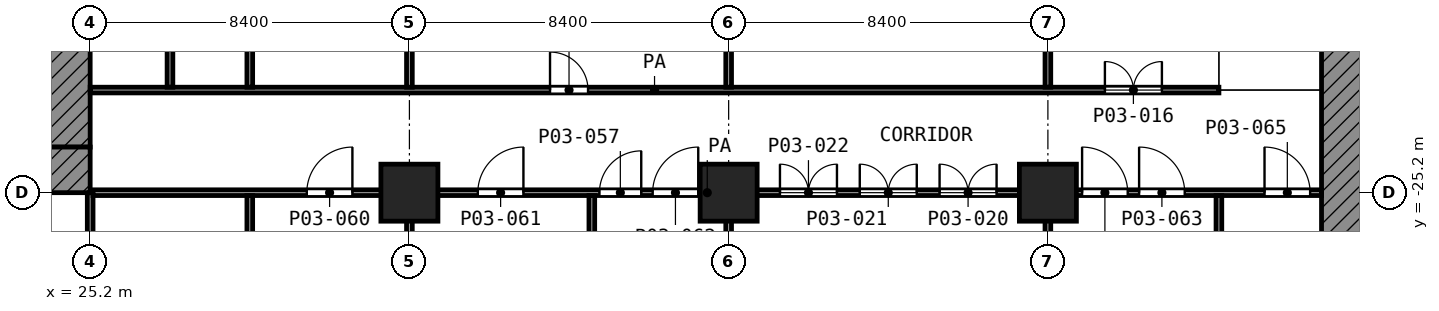
"""IFC4 building model, lengths in metres.
Left out: names, types, materials, properties, quantities, classifications, styles, units other than length and angle.
Written with IfcOpenShell. Run it as: python <this file> out.ifc"""

import sys

from ifc_helpers import new_model, si_unit, direction, frame, frame_2d, origin, origin_2d, place, context, subcontext, project, spatial, polyline, rectangle, outline, extrude, element, fill, save


model = new_model("IFC4")
c1 = context("Model", 3, precision=1e-05, world=origin(), true_north=direction((0.0, 1.0)))
c2 = subcontext(c1, "Body", "Model", "MODEL_VIEW")
j1 = project(units=[si_unit("LENGTHUNIT", "METRE"), si_unit("PLANEANGLEUNIT", "RADIAN")], contexts=[c1])
p1 = place(None, origin())
s1 = spatial("IfcSite", under=j1, at=p1, CompositionType="ELEMENT")
p2 = place(p1, origin())
s2 = spatial("IfcBuilding", under=s1, at=p2, CompositionType="ELEMENT")
p3 = place(p2, frame((0.0, 0.0, 12.6)))
s3 = spatial("IfcBuildingStorey", under=s2, at=p3, CompositionType="ELEMENT", Elevation=12.6)
for number, where, z_axis, x_axis in (
    (1, (33.6, -25.2, 0.0), (0.0, 0.0, 1.0), (1.0, 0.0, 0.0)),
    (2, (42.0, -25.2, 0.0), (0.0, 0.0, 1.0), (1.0, 0.0, 0.0)),
    (3, (50.4, -25.2, 0.0), (0.0, 0.0, 1.0), (1.0, 0.0, 0.0)),
):
    element("IfcColumn", number, at=place(p3, frame(where, z_axis=z_axis, x_axis=x_axis)), inside=s3, PredefinedType="COLUMN", context=c2, shape_type="SweptSolid", body=[
        extrude(rectangle(XDim=1.5, YDim=1.5, at=origin_2d()), origin(), (0.0, 0.0, 1.0), 5.6),
    ])
p4 = place(p3, frame((0.0, 0.0, -12.6), z_axis=(0.0, -1.0, 0.0), x_axis=(1.0, 0.0, 0.0)))
e4 = element("IfcWall", 4, at=p4, inside=s3, PredefinedType="SHEAR", context=c2, shape_type="SweptSolid", body=[
    extrude(outline(polyline([(62.938, 18.2), (62.484, 17.583), (61.414, 15.591), (60.634, 13.468), (60.448, 12.6), (57.6, 12.6), (57.6, 18.2), (62.938, 18.2)])), origin(), (0.0, 0.0, 1.0), 33.6),
])
p5 = place(p3, frame((24.6, -24.0, 0.0), z_axis=(0.0, 0.0, 1.0), x_axis=(0.0, 1.0, 0.0)))
e5 = element("IfcWall", 5, at=p5, inside=s3, PredefinedType="SHEAR", context=c2, shape_type="SweptSolid", body=[
    extrude(rectangle(XDim=18.6, YDim=1.2, at=frame_2d((9.3, 0.0))), origin(), (0.0, 0.0, 1.0), 5.25),
])
p6 = place(p5, frame((10.5, 0.0, 0.0)))
e6 = element("IfcOpeningElement", 6, at=p6, cuts=e5, PredefinedType="OPENING", context=c2, shape_type="SweptSolid", body=[
    extrude(rectangle(XDim=1.8, YDim=2.1, at=frame_2d((0.9, 1.05))), frame((0.0, 0.61, 0.0), z_axis=(0.0, -1.0, 0.0), x_axis=(1.0, 0.0, 0.0)), (0.0, 0.0, 1.0), 1.22),
])
p7 = place(p3, frame((24.6, -25.2, 0.0), z_axis=(0.0, 0.0, 1.0), x_axis=(0.0, 1.0, 0.0)))
e7 = element("IfcWall", 7, at=p7, inside=s3, PredefinedType="SHEAR", context=c2, shape_type="SweptSolid", body=[
    extrude(rectangle(XDim=1.2, YDim=1.2, at=frame_2d((0.6, 0.0))), origin(), (0.0, 0.0, 1.0), 5.25),
])
p8 = place(p3, frame((25.275, -25.2, 0.0), z_axis=(0.0, 0.0, 1.0), x_axis=(1.0, 0.0, 0.0)))
e8 = element("IfcWall", 8, at=p8, inside=s3, PredefinedType="PARTITIONING", context=c2, shape_type="SweptSolid", body=[
    extrude(rectangle(XDim=32.325, YDim=0.15, at=frame_2d((16.163, 0.0))), origin(), (0.0, 0.0, 1.0), 5.25),
])
p9 = place(p8, frame((5.625, 0.0, 0.0)))
e9 = element("IfcOpeningElement", 9, at=p9, cuts=e8, PredefinedType="OPENING", context=c2, shape_type="SweptSolid", body=[
    extrude(rectangle(XDim=1.2, YDim=2.1, at=frame_2d((0.6, 1.05))), frame((0.0, 0.085, 0.0), z_axis=(0.0, -1.0, 0.0), x_axis=(1.0, 0.0, 0.0)), (0.0, 0.0, 1.0), 0.17),
])
p10 = place(p8, frame((10.125, 0.0, 0.0)))
e10 = element("IfcOpeningElement", 10, at=p10, cuts=e8, PredefinedType="OPENING", context=c2, shape_type="SweptSolid", body=[
    extrude(rectangle(XDim=1.2, YDim=2.1, at=frame_2d((0.6, 1.05))), frame((0.0, 0.085, 0.0), z_axis=(0.0, -1.0, 0.0), x_axis=(1.0, 0.0, 0.0)), (0.0, 0.0, 1.0), 0.17),
])
p11 = place(p8, frame((14.725, 0.0, 0.0)))
e11 = element("IfcOpeningElement", 11, at=p11, cuts=e8, PredefinedType="OPENING", context=c2, shape_type="SweptSolid", body=[
    extrude(rectangle(XDim=1.2, YDim=2.1, at=frame_2d((0.6, 1.05))), frame((0.0, 0.085, 0.0), z_axis=(0.0, -1.0, 0.0), x_axis=(1.0, 0.0, 0.0)), (0.0, 0.0, 1.0), 0.17),
])
p12 = place(p8, frame((13.325, 0.0, 0.0)))
e12 = element("IfcOpeningElement", 12, at=p12, cuts=e8, PredefinedType="OPENING", context=c2, shape_type="SweptSolid", body=[
    extrude(rectangle(XDim=1.1, YDim=2.1, at=frame_2d((0.55, 1.05))), frame((0.0, 0.085, 0.0), z_axis=(0.0, -1.0, 0.0), x_axis=(1.0, 0.0, 0.0)), (0.0, 0.0, 1.0), 0.17),
])
p13 = place(p8, frame((22.275, 0.0, 0.0)))
e13 = element("IfcOpeningElement", 13, at=p13, cuts=e8, PredefinedType="OPENING", context=c2, shape_type="SweptSolid", body=[
    extrude(rectangle(XDim=1.5, YDim=2.1, at=frame_2d((0.75, 1.05))), frame((0.0, 0.085, 0.0), z_axis=(0.0, -1.0, 0.0), x_axis=(1.0, 0.0, 0.0)), (0.0, 0.0, 1.0), 0.17),
])
p14 = place(p8, frame((20.175, 0.0, 0.0)))
e14 = element("IfcOpeningElement", 14, at=p14, cuts=e8, PredefinedType="OPENING", context=c2, shape_type="SweptSolid", body=[
    extrude(rectangle(XDim=1.5, YDim=2.1, at=frame_2d((0.75, 1.05))), frame((0.0, 0.085, 0.0), z_axis=(0.0, -1.0, 0.0), x_axis=(1.0, 0.0, 0.0)), (0.0, 0.0, 1.0), 0.17),
])
p15 = place(p8, frame((18.075, 0.0, 0.0)))
e15 = element("IfcOpeningElement", 15, at=p15, cuts=e8, PredefinedType="OPENING", context=c2, shape_type="SweptSolid", body=[
    extrude(rectangle(XDim=1.5, YDim=2.1, at=frame_2d((0.75, 1.05))), frame((0.0, 0.085, 0.0), z_axis=(0.0, -1.0, 0.0), x_axis=(1.0, 0.0, 0.0)), (0.0, 0.0, 1.0), 0.17),
])
p16 = place(p8, frame((27.525, 0.0, 0.0)))
e16 = element("IfcOpeningElement", 16, at=p16, cuts=e8, PredefinedType="OPENING", context=c2, shape_type="SweptSolid", body=[
    extrude(rectangle(XDim=1.2, YDim=2.1, at=frame_2d((0.6, 1.05))), frame((0.0, 0.085, 0.0), z_axis=(0.0, -1.0, 0.0), x_axis=(1.0, 0.0, 0.0)), (0.0, 0.0, 1.0), 0.17),
])
p17 = place(p8, frame((26.025, 0.0, 0.0)))
e17 = element("IfcOpeningElement", 17, at=p17, cuts=e8, PredefinedType="OPENING", context=c2, shape_type="SweptSolid", body=[
    extrude(rectangle(XDim=1.2, YDim=2.1, at=frame_2d((0.6, 1.05))), frame((0.0, 0.085, 0.0), z_axis=(0.0, -1.0, 0.0), x_axis=(1.0, 0.0, 0.0)), (0.0, 0.0, 1.0), 0.17),
])
p18 = place(p8, frame((30.825, 0.0, 0.0)))
e18 = element("IfcOpeningElement", 18, at=p18, cuts=e8, PredefinedType="OPENING", context=c2, shape_type="SweptSolid", body=[
    extrude(rectangle(XDim=1.2, YDim=2.1, at=frame_2d((0.6, 1.05))), frame((0.0, 0.085, 0.0), z_axis=(0.0, -1.0, 0.0), x_axis=(1.0, 0.0, 0.0)), (0.0, 0.0, 1.0), 0.17),
])
p19 = place(p3, frame((25.2, -22.5, 0.0), z_axis=(0.0, 0.0, 1.0), x_axis=(1.0, 0.0, 0.0)))
e19 = element("IfcWall", 19, at=p19, inside=s3, PredefinedType="PARTITIONING", context=c2, shape_type="SweptSolid", body=[
    extrude(rectangle(XDim=29.7, YDim=0.15, at=frame_2d((14.85, 0.0))), origin(), (0.0, 0.0, 1.0), 5.25),
])
p20 = place(p19, frame((12.1, 0.0, 0.0)))
e20 = element("IfcOpeningElement", 20, at=p20, cuts=e19, PredefinedType="OPENING", context=c2, shape_type="SweptSolid", body=[
    extrude(rectangle(XDim=1.0, YDim=2.1, at=frame_2d((0.5, 1.05))), frame((0.0, 0.085, 0.0), z_axis=(0.0, -1.0, 0.0), x_axis=(1.0, 0.0, 0.0)), (0.0, 0.0, 1.0), 0.17),
])
p21 = place(p19, frame((26.7, 0.0, 0.0)))
e21 = element("IfcOpeningElement", 21, at=p21, cuts=e19, PredefinedType="OPENING", context=c2, shape_type="SweptSolid", body=[
    extrude(rectangle(XDim=1.5, YDim=2.1, at=frame_2d((0.75, 1.05))), frame((0.0, 0.085, 0.0), z_axis=(0.0, -1.0, 0.0), x_axis=(1.0, 0.0, 0.0)), (0.0, 0.0, 1.0), 0.17),
])
p22 = place(p3, frame((25.2, -81.3, 0.0), z_axis=(0.0, 0.0, 1.0), x_axis=(0.0, 1.0, 0.0)))
e22 = element("IfcWall", 22, at=p22, inside=s3, PredefinedType="PARTITIONING", context=c2, shape_type="SweptSolid", body=[
    extrude(rectangle(XDim=56.1, YDim=0.15, at=frame_2d((28.05, 0.0))), origin(), (0.0, 0.0, 1.0), 5.25),
])
p23 = place(p22, frame((48.5, 0.0, 0.0)))
e23 = element("IfcOpeningElement", 23, at=p23, cuts=e22, PredefinedType="OPENING", context=c2, shape_type="SweptSolid", body=[
    extrude(rectangle(XDim=1.2, YDim=2.1, at=frame_2d((0.6, 1.05))), frame((0.0, 0.085, 0.0), z_axis=(0.0, -1.0, 0.0), x_axis=(1.0, 0.0, 0.0)), (0.0, 0.0, 1.0), 0.17),
])
p24 = place(p22, frame((40.1, 0.0, 0.0)))
e24 = element("IfcOpeningElement", 24, at=p24, cuts=e22, PredefinedType="OPENING", context=c2, shape_type="SweptSolid", body=[
    extrude(rectangle(XDim=1.2, YDim=2.1, at=frame_2d((0.6, 1.05))), frame((0.0, 0.085, 0.0), z_axis=(0.0, -1.0, 0.0), x_axis=(1.0, 0.0, 0.0)), (0.0, 0.0, 1.0), 0.17),
])
p25 = place(p22, frame((36.75, 0.0, 0.0)))
e25 = element("IfcOpeningElement", 25, at=p25, cuts=e22, PredefinedType="OPENING", context=c2, shape_type="SweptSolid", body=[
    extrude(rectangle(XDim=1.2, YDim=2.1, at=frame_2d((0.6, 1.05))), frame((0.0, 0.085, 0.0), z_axis=(0.0, -1.0, 0.0), x_axis=(1.0, 0.0, 0.0)), (0.0, 0.0, 1.0), 0.17),
])
p26 = place(p22, frame((32.55, 0.0, 0.0)))
e26 = element("IfcOpeningElement", 26, at=p26, cuts=e22, PredefinedType="OPENING", context=c2, shape_type="SweptSolid", body=[
    extrude(rectangle(XDim=1.2, YDim=2.1, at=frame_2d((0.6, 1.05))), frame((0.0, 0.085, 0.0), z_axis=(0.0, -1.0, 0.0), x_axis=(1.0, 0.0, 0.0)), (0.0, 0.0, 1.0), 0.17),
])
p27 = place(p22, frame((28.05, 0.0, 0.0)))
e27 = element("IfcOpeningElement", 27, at=p27, cuts=e22, PredefinedType="OPENING", context=c2, shape_type="SweptSolid", body=[
    extrude(rectangle(XDim=1.2, YDim=2.1, at=frame_2d((0.6, 1.05))), frame((0.0, 0.085, 0.0), z_axis=(0.0, -1.0, 0.0), x_axis=(1.0, 0.0, 0.0)), (0.0, 0.0, 1.0), 0.17),
])
p28 = place(p22, frame((23.85, 0.0, 0.0)))
e28 = element("IfcOpeningElement", 28, at=p28, cuts=e22, PredefinedType="OPENING", context=c2, shape_type="SweptSolid", body=[
    extrude(rectangle(XDim=1.2, YDim=2.1, at=frame_2d((0.6, 1.05))), frame((0.0, 0.085, 0.0), z_axis=(0.0, -1.0, 0.0), x_axis=(1.0, 0.0, 0.0)), (0.0, 0.0, 1.0), 0.17),
])
p29 = place(p22, frame((20.1, 0.0, 0.0)))
e29 = element("IfcOpeningElement", 29, at=p29, cuts=e22, PredefinedType="OPENING", context=c2, shape_type="SweptSolid", body=[
    extrude(rectangle(XDim=1.2, YDim=2.1, at=frame_2d((0.6, 1.05))), frame((0.0, 0.085, 0.0), z_axis=(0.0, -1.0, 0.0), x_axis=(1.0, 0.0, 0.0)), (0.0, 0.0, 1.0), 0.17),
])
p30 = place(p22, frame((15.9, 0.0, 0.0)))
e30 = element("IfcOpeningElement", 30, at=p30, cuts=e22, PredefinedType="OPENING", context=c2, shape_type="SweptSolid", body=[
    extrude(rectangle(XDim=1.2, YDim=2.1, at=frame_2d((0.6, 1.05))), frame((0.0, 0.085, 0.0), z_axis=(0.0, -1.0, 0.0), x_axis=(1.0, 0.0, 0.0)), (0.0, 0.0, 1.0), 0.17),
])
p31 = place(p22, frame((11.4, 0.0, 0.0)))
e31 = element("IfcOpeningElement", 31, at=p31, cuts=e22, PredefinedType="OPENING", context=c2, shape_type="SweptSolid", body=[
    extrude(rectangle(XDim=1.2, YDim=2.1, at=frame_2d((0.6, 1.05))), frame((0.0, 0.085, 0.0), z_axis=(0.0, -1.0, 0.0), x_axis=(1.0, 0.0, 0.0)), (0.0, 0.0, 1.0), 0.17),
])
p32 = place(p22, frame((7.2, 0.0, 0.0)))
e32 = element("IfcOpeningElement", 32, at=p32, cuts=e22, PredefinedType="OPENING", context=c2, shape_type="SweptSolid", body=[
    extrude(rectangle(XDim=1.2, YDim=2.1, at=frame_2d((0.6, 1.05))), frame((0.0, 0.085, 0.0), z_axis=(0.0, -1.0, 0.0), x_axis=(1.0, 0.0, 0.0)), (0.0, 0.0, 1.0), 0.17),
])
p33 = place(p22, frame((2.7, 0.0, 0.0)))
e33 = element("IfcOpeningElement", 33, at=p33, cuts=e22, PredefinedType="OPENING", context=c2, shape_type="SweptSolid", body=[
    extrude(rectangle(XDim=1.2, YDim=2.1, at=frame_2d((0.6, 1.05))), frame((0.0, 0.085, 0.0), z_axis=(0.0, -1.0, 0.0), x_axis=(1.0, 0.0, 0.0)), (0.0, 0.0, 1.0), 0.17),
])
p34 = place(p3, frame((27.3, -22.425, 0.0), z_axis=(0.0, 0.0, 1.0), x_axis=(0.0, 1.0, 0.0)))
e34 = element("IfcWall", 34, at=p34, inside=s3, PredefinedType="PARTITIONING", context=c2, shape_type="SweptSolid", body=[
    extrude(rectangle(XDim=8.25, YDim=0.15, at=frame_2d((4.125, 0.0))), origin(), (0.0, 0.0, 1.0), 5.25),
])
p35 = place(p3, frame((29.4, -39.525, 0.0), z_axis=(0.0, 0.0, 1.0), x_axis=(0.0, 1.0, 0.0)))
e35 = element("IfcWall", 35, at=p35, inside=s3, PredefinedType="PARTITIONING", context=c2, shape_type="SweptSolid", body=[
    extrude(rectangle(XDim=14.25, YDim=0.15, at=frame_2d((7.125, 0.0))), origin(), (0.0, 0.0, 1.0), 5.25),
])
p36 = place(p3, frame((29.4, -22.425, 0.0), z_axis=(0.0, 0.0, 1.0), x_axis=(0.0, 1.0, 0.0)))
e36 = element("IfcWall", 36, at=p36, inside=s3, PredefinedType="PARTITIONING", context=c2, shape_type="SweptSolid", body=[
    extrude(rectangle(XDim=11.325, YDim=0.15, at=frame_2d((5.663, 0.0))), origin(), (0.0, 0.0, 1.0), 5.25),
])
p37 = place(p3, frame((33.6, -39.525, 0.0), z_axis=(0.0, 0.0, 1.0), x_axis=(0.0, 1.0, 0.0)))
e37 = element("IfcWall", 37, at=p37, inside=s3, PredefinedType="PARTITIONING", context=c2, shape_type="SweptSolid", body=[
    extrude(rectangle(XDim=14.25, YDim=0.15, at=frame_2d((7.125, 0.0))), origin(), (0.0, 0.0, 1.0), 5.25),
])
p38 = place(p3, frame((33.6, -22.425, 0.0), z_axis=(0.0, 0.0, 1.0), x_axis=(0.0, 1.0, 0.0)))
e38 = element("IfcWall", 38, at=p38, inside=s3, PredefinedType="PARTITIONING", context=c2, shape_type="SweptSolid", body=[
    extrude(rectangle(XDim=11.25, YDim=0.15, at=frame_2d((5.625, 0.0))), origin(), (0.0, 0.0, 1.0), 5.25),
])
p39 = place(p3, frame((38.4, -37.487, 0.0), z_axis=(0.0, 0.0, 1.0), x_axis=(0.0, 1.0, 0.0)))
e39 = element("IfcWall", 39, at=p39, inside=s3, PredefinedType="PARTITIONING", context=c2, shape_type="SweptSolid", body=[
    extrude(rectangle(XDim=12.212, YDim=0.15, at=frame_2d((6.106, 0.0))), origin(), (0.0, 0.0, 1.0), 3.85),
])
p40 = place(p3, frame((42.0, -34.88, 0.0), z_axis=(0.0, 0.0, 1.0), x_axis=(0.0, 1.0, 0.0)))
e40 = element("IfcWall", 40, at=p40, inside=s3, PredefinedType="PARTITIONING", context=c2, shape_type="SweptSolid", body=[
    extrude(rectangle(XDim=9.605, YDim=0.15, at=frame_2d((4.802, 0.0))), origin(), (0.0, 0.0, 1.0), 3.85),
])
p41 = place(p3, frame((42.0, -22.425, 0.0), z_axis=(0.0, 0.0, 1.0), x_axis=(0.0, 1.0, 0.0)))
e41 = element("IfcWall", 41, at=p41, inside=s3, PredefinedType="PARTITIONING", context=c2, shape_type="SweptSolid", body=[
    extrude(rectangle(XDim=11.25, YDim=0.15, at=frame_2d((5.625, 0.0))), origin(), (0.0, 0.0, 1.0), 5.25),
])
p42 = place(p3, frame((50.4, -34.88, 0.0), z_axis=(0.0, 0.0, 1.0), x_axis=(0.0, 1.0, 0.0)))
e42 = element("IfcWall", 42, at=p42, inside=s3, PredefinedType="PARTITIONING", context=c2, shape_type="SweptSolid", body=[
    extrude(rectangle(XDim=9.605, YDim=0.15, at=frame_2d((4.802, 0.0))), origin(), (0.0, 0.0, 1.0), 4.35),
])
p43 = place(p3, frame((50.4, -22.425, 0.0), z_axis=(0.0, 0.0, 1.0), x_axis=(0.0, 1.0, 0.0)))
e43 = element("IfcWall", 43, at=p43, inside=s3, PredefinedType="PARTITIONING", context=c2, shape_type="SweptSolid", body=[
    extrude(rectangle(XDim=11.25, YDim=0.15, at=frame_2d((5.625, 0.0))), origin(), (0.0, 0.0, 1.0), 5.25),
])
p44 = place(p3, frame((54.9, -34.88, 0.0), z_axis=(0.0, 0.0, 1.0), x_axis=(0.0, 1.0, 0.0)))
e44 = element("IfcWall", 44, at=p44, inside=s3, PredefinedType="PARTITIONING", context=c2, shape_type="SweptSolid", body=[
    extrude(rectangle(XDim=9.605, YDim=0.15, at=frame_2d((4.802, 0.0))), origin(), (0.0, 0.0, 1.0), 5.25),
])
p45 = place(p20, origin())
e45 = element("IfcDoor", 45, at=p45, inside=s3, OperationType="SINGLE_SWING_LEFT", PredefinedType="DOOR", context=c2, shape_type="SweptSolid", body=[
    extrude(rectangle(XDim=1.0, YDim=2.1, at=frame_2d((0.5, 1.05))), frame((0.0, 0.025, 0.0), z_axis=(0.0, -1.0, 0.0), x_axis=(1.0, 0.0, 0.0)), (0.0, 0.0, 1.0), 0.05),
])
fill(e20, e45)
p46 = place(p21, origin())
e46 = element("IfcDoor", 46, at=p46, inside=s3, OperationType="DOUBLE_DOOR_SINGLE_SWING", PredefinedType="DOOR", context=c2, shape_type="SweptSolid", body=[
    extrude(rectangle(XDim=1.5, YDim=2.1, at=frame_2d((0.75, 1.05))), frame((0.0, 0.025, 0.0), z_axis=(0.0, -1.0, 0.0), x_axis=(1.0, 0.0, 0.0)), (0.0, 0.0, 1.0), 0.05),
])
fill(e21, e46)
p47 = place(p9, origin())
e47 = element("IfcDoor", 47, at=p47, inside=s3, OperationType="SINGLE_SWING_RIGHT", PredefinedType="DOOR", context=c2, shape_type="SweptSolid", body=[
    extrude(rectangle(XDim=1.2, YDim=2.1, at=frame_2d((0.6, 1.05))), frame((0.0, 0.025, 0.0), z_axis=(0.0, -1.0, 0.0), x_axis=(1.0, 0.0, 0.0)), (0.0, 0.0, 1.0), 0.05),
])
fill(e9, e47)
p48 = place(p10, origin())
e48 = element("IfcDoor", 48, at=p48, inside=s3, OperationType="SINGLE_SWING_RIGHT", PredefinedType="DOOR", context=c2, shape_type="SweptSolid", body=[
    extrude(rectangle(XDim=1.2, YDim=2.1, at=frame_2d((0.6, 1.05))), frame((0.0, 0.025, 0.0), z_axis=(0.0, -1.0, 0.0), x_axis=(1.0, 0.0, 0.0)), (0.0, 0.0, 1.0), 0.05),
])
fill(e10, e48)
p49 = place(p11, origin())
e49 = element("IfcDoor", 49, at=p49, inside=s3, OperationType="SINGLE_SWING_RIGHT", PredefinedType="DOOR", context=c2, shape_type="SweptSolid", body=[
    extrude(rectangle(XDim=1.2, YDim=2.1, at=frame_2d((0.6, 1.05))), frame((0.0, 0.025, 0.0), z_axis=(0.0, -1.0, 0.0), x_axis=(1.0, 0.0, 0.0)), (0.0, 0.0, 1.0), 0.05),
])
fill(e11, e49)
p50 = place(p12, origin())
e50 = element("IfcDoor", 50, at=p50, inside=s3, OperationType="SINGLE_SWING_RIGHT", PredefinedType="DOOR", context=c2, shape_type="SweptSolid", body=[
    extrude(rectangle(XDim=1.1, YDim=2.1, at=frame_2d((0.55, 1.05))), frame((0.0, 0.025, 0.0), z_axis=(0.0, -1.0, 0.0), x_axis=(1.0, 0.0, 0.0)), (0.0, 0.0, 1.0), 0.05),
])
fill(e12, e50)
p51 = place(p13, origin())
e51 = element("IfcDoor", 51, at=p51, inside=s3, OperationType="DOUBLE_DOOR_SINGLE_SWING", PredefinedType="DOOR", context=c2, shape_type="SweptSolid", body=[
    extrude(rectangle(XDim=1.5, YDim=2.1, at=frame_2d((0.75, 1.05))), frame((0.0, 0.025, 0.0), z_axis=(0.0, -1.0, 0.0), x_axis=(1.0, 0.0, 0.0)), (0.0, 0.0, 1.0), 0.05),
])
fill(e13, e51)
p52 = place(p14, origin())
e52 = element("IfcDoor", 52, at=p52, inside=s3, OperationType="DOUBLE_DOOR_SINGLE_SWING", PredefinedType="DOOR", context=c2, shape_type="SweptSolid", body=[
    extrude(rectangle(XDim=1.5, YDim=2.1, at=frame_2d((0.75, 1.05))), frame((0.0, 0.025, 0.0), z_axis=(0.0, -1.0, 0.0), x_axis=(1.0, 0.0, 0.0)), (0.0, 0.0, 1.0), 0.05),
])
fill(e14, e52)
p53 = place(p15, origin())
e53 = element("IfcDoor", 53, at=p53, inside=s3, OperationType="DOUBLE_DOOR_SINGLE_SWING", PredefinedType="DOOR", context=c2, shape_type="SweptSolid", body=[
    extrude(rectangle(XDim=1.5, YDim=2.1, at=frame_2d((0.75, 1.05))), frame((0.0, 0.025, 0.0), z_axis=(0.0, -1.0, 0.0), x_axis=(1.0, 0.0, 0.0)), (0.0, 0.0, 1.0), 0.05),
])
fill(e15, e53)
p54 = place(p16, origin())
e54 = element("IfcDoor", 54, at=p54, inside=s3, OperationType="SINGLE_SWING_LEFT", PredefinedType="DOOR", context=c2, shape_type="SweptSolid", body=[
    extrude(rectangle(XDim=1.2, YDim=2.1, at=frame_2d((0.6, 1.05))), frame((0.0, 0.025, 0.0), z_axis=(0.0, -1.0, 0.0), x_axis=(1.0, 0.0, 0.0)), (0.0, 0.0, 1.0), 0.05),
])
fill(e16, e54)
p55 = place(p17, origin())
e55 = element("IfcDoor", 55, at=p55, inside=s3, OperationType="SINGLE_SWING_LEFT", PredefinedType="DOOR", context=c2, shape_type="SweptSolid", body=[
    extrude(rectangle(XDim=1.2, YDim=2.1, at=frame_2d((0.6, 1.05))), frame((0.0, 0.025, 0.0), z_axis=(0.0, -1.0, 0.0), x_axis=(1.0, 0.0, 0.0)), (0.0, 0.0, 1.0), 0.05),
])
fill(e17, e55)
p56 = place(p18, origin())
e56 = element("IfcDoor", 56, at=p56, inside=s3, OperationType="SINGLE_SWING_LEFT", PredefinedType="DOOR", context=c2, shape_type="SweptSolid", body=[
    extrude(rectangle(XDim=1.2, YDim=2.1, at=frame_2d((0.6, 1.05))), frame((0.0, 0.025, 0.0), z_axis=(0.0, -1.0, 0.0), x_axis=(1.0, 0.0, 0.0)), (0.0, 0.0, 1.0), 0.05),
])
fill(e18, e56)
save(model, sys.argv[1])
